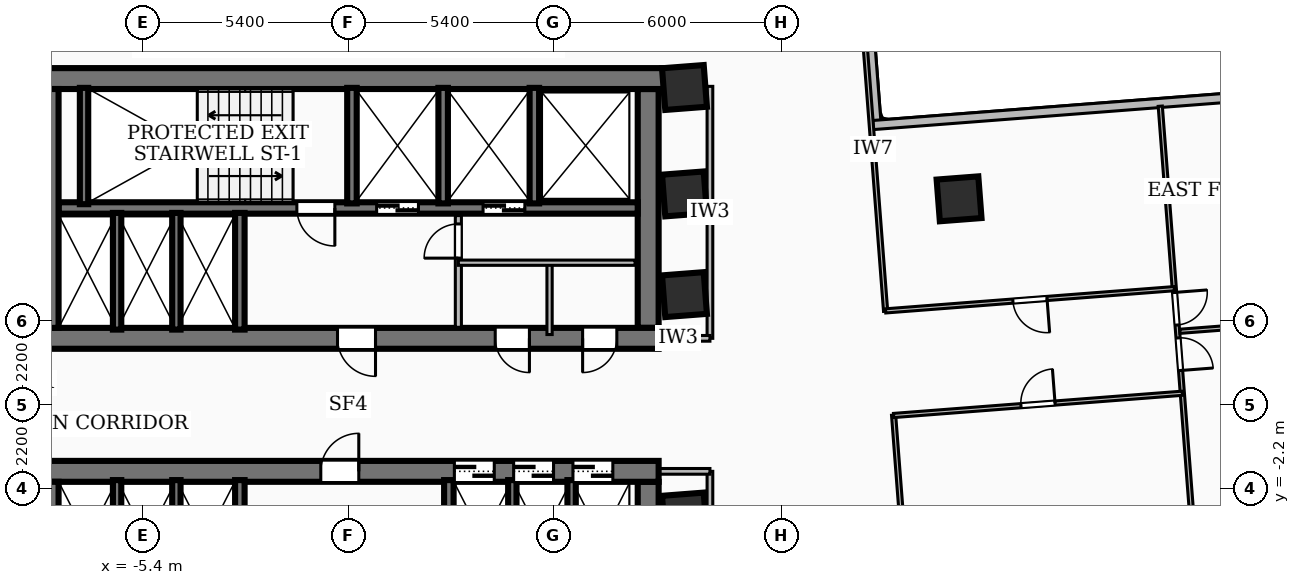
"""IFC4 building model, lengths in metres.
Left out: names, types, materials, properties, quantities, classifications, styles, units other than length and angle.
Written with IfcOpenShell. Run it as: python <this file> out.ifc"""

import sys

from ifc_helpers import new_model, si_unit, direction, frame, frame_2d, origin, origin_2d, place, context, subcontext, project, spatial, rectangle, extrude, element, fill, save


model = new_model("IFC4")
c1 = context("Model", 3, precision=1e-05, world=origin(), true_north=direction((0.0, 1.0)))
c2 = subcontext(c1, "Body", "Model", "MODEL_VIEW")
j1 = project(units=[si_unit("LENGTHUNIT", "METRE"), si_unit("PLANEANGLEUNIT", "RADIAN")], contexts=[c1])
p1 = place(None, origin())
s1 = spatial("IfcSite", under=j1, at=p1, CompositionType="ELEMENT")
p2 = place(p1, origin())
s2 = spatial("IfcBuilding", under=s1, at=p2, CompositionType="ELEMENT")
p3 = place(p2, frame((0.0, 0.0, 56.88)))
s3 = spatial("IfcBuildingStorey", under=s2, at=p3, CompositionType="ELEMENT", Elevation=56.88)
p4 = place(p3, frame((-8.78, 8.585, 0.0), z_axis=(0.0, 0.0, 1.0), x_axis=(1.0, 0.0, 0.0)))
e1 = element("IfcWall", 1, at=p4, inside=s3, PredefinedType="SHEAR", context=c2, shape_type="SweptSolid", body=[
    extrude(rectangle(XDim=17.56, YDim=0.55, at=frame_2d((8.78, 0.0))), origin(), (0.0, 0.0, 1.0), 3.32),
])
p5 = place(p3, frame((8.17, 1.75, 0.0), z_axis=(0.0, 0.0, 1.0), x_axis=(-1.0, 0.0, 0.0)))
e2 = element("IfcWall", 2, at=p5, inside=s3, PredefinedType="SHEAR", context=c2, shape_type="SweptSolid", body=[
    extrude(rectangle(XDim=16.34, YDim=0.55, at=frame_2d((8.17, 0.0))), origin(), (0.0, 0.0, 1.0), 3.32),
])
p6 = place(p5, frame((7.45, 0.0, 0.0)))
e3 = element("IfcOpeningElement", 3, at=p6, cuts=e2, PredefinedType="OPENING", context=c2, shape_type="SweptSolid", body=[
    extrude(rectangle(XDim=1.0, YDim=2.1, at=frame_2d((0.5, 1.05))), frame((0.0, 0.285, 0.0), z_axis=(0.0, -1.0, 0.0), x_axis=(1.0, 0.0, 0.0)), (0.0, 0.0, 1.0), 0.57),
])
p7 = place(p5, frame((3.4, 0.0, 0.0)))
e4 = element("IfcOpeningElement", 4, at=p7, cuts=e2, PredefinedType="OPENING", context=c2, shape_type="SweptSolid", body=[
    extrude(rectangle(XDim=0.9, YDim=2.06, at=frame_2d((0.45, 1.03))), frame((0.0, 0.285, 0.0), z_axis=(0.0, -1.0, 0.0), x_axis=(1.0, 0.0, 0.0)), (0.0, 0.0, 1.0), 0.57),
])
p8 = place(p5, frame((1.1, 0.0, 0.0)))
e5 = element("IfcOpeningElement", 5, at=p8, cuts=e2, PredefinedType="OPENING", context=c2, shape_type="SweptSolid", body=[
    extrude(rectangle(XDim=0.9, YDim=2.06, at=frame_2d((0.45, 1.03))), frame((0.0, 0.285, 0.0), z_axis=(0.0, -1.0, 0.0), x_axis=(1.0, 0.0, 0.0)), (0.0, 0.0, 1.0), 0.57),
])
for number, where, z_axis, x_axis in (
    (6, (-7.895, 2.025, 0.0), (0.0, 0.0, 1.0), (0.0, 1.0, 0.0)),
    (7, (7.895, 8.31, 0.0), (0.0, 0.0, 1.0), (0.0, -1.0, 0.0)),
):
    element("IfcWall", number, at=place(p3, frame(where, z_axis=z_axis, x_axis=x_axis)), inside=s3, PredefinedType="SHEAR", context=c2, shape_type="SweptSolid", body=[
        extrude(rectangle(XDim=6.285, YDim=0.55, at=frame_2d((3.143, 0.0))), origin(), (0.0, 0.0, 1.0), 3.32),
    ])
p9 = place(p3, frame((7.62, 5.18, 0.0), z_axis=(0.0, 0.0, 1.0), x_axis=(-1.0, 0.0, 0.0)))
e8 = element("IfcWall", 8, at=p9, inside=s3, PredefinedType="SOLIDWALL", context=c2, shape_type="SweptSolid", body=[
    extrude(rectangle(XDim=15.24, YDim=0.3, at=frame_2d((7.62, 0.0))), origin(), (0.0, 0.0, 1.0), 3.32),
])
p10 = place(p9, frame((5.77, 0.0, 0.0)))
e9 = element("IfcOpeningElement", 9, at=p10, cuts=e8, PredefinedType="OPENING", context=c2, shape_type="SweptSolid", body=[
    extrude(rectangle(XDim=1.1, YDim=2.15, at=frame_2d((0.55, 1.075))), frame((0.0, 0.16, 0.0), z_axis=(0.0, -1.0, 0.0), x_axis=(1.0, 0.0, 0.0)), (0.0, 0.0, 1.0), 0.32),
])
p11 = place(p9, frame((2.97, 0.0, 0.0)))
e10 = element("IfcOpeningElement", 10, at=p11, cuts=e8, PredefinedType="OPENING", context=c2, shape_type="SweptSolid", body=[
    extrude(rectangle(XDim=1.1, YDim=2.15, at=frame_2d((0.55, 1.075))), frame((0.0, 0.16, 0.0), z_axis=(0.0, -1.0, 0.0), x_axis=(1.0, 0.0, 0.0)), (0.0, 0.0, 1.0), 0.32),
])
p12 = place(p9, frame((7.97, 0.0, 0.0)))
e11 = element("IfcOpeningElement", 11, at=p12, cuts=e8, PredefinedType="OPENING", context=c2, shape_type="SweptSolid", body=[
    extrude(rectangle(XDim=1.0, YDim=2.1, at=frame_2d((0.5, 1.05))), frame((0.0, 0.16, 0.0), z_axis=(0.0, -1.0, 0.0), x_axis=(1.0, 0.0, 0.0)), (0.0, 0.0, 1.0), 0.32),
])
p13 = place(p3, frame((-8.17, -1.75, 0.0), z_axis=(0.0, 0.0, 1.0), x_axis=(1.0, 0.0, 0.0)))
e12 = element("IfcWall", 12, at=p13, inside=s3, PredefinedType="SHEAR", context=c2, shape_type="SweptSolid", body=[
    extrude(rectangle(XDim=16.34, YDim=0.55, at=frame_2d((8.17, 0.0))), origin(), (0.0, 0.0, 1.0), 3.32),
])
p14 = place(p13, frame((7.45, 0.0, 0.0)))
e13 = element("IfcOpeningElement", 13, at=p14, cuts=e12, PredefinedType="OPENING", context=c2, shape_type="SweptSolid", body=[
    extrude(rectangle(XDim=1.0, YDim=2.1, at=frame_2d((0.5, 1.05))), frame((0.0, 0.285, 0.0), z_axis=(0.0, -1.0, 0.0), x_axis=(1.0, 0.0, 0.0)), (0.0, 0.0, 1.0), 0.57),
])
p15 = place(p13, frame((10.965, 0.0, 0.0)))
e14 = element("IfcOpeningElement", 14, at=p15, cuts=e12, PredefinedType="OPENING", context=c2, shape_type="SweptSolid", body=[
    extrude(rectangle(XDim=1.05, YDim=2.15, at=frame_2d((0.525, 1.075))), frame((0.0, 0.285, 0.0), z_axis=(0.0, -1.0, 0.0), x_axis=(1.0, 0.0, 0.0)), (0.0, 0.0, 1.0), 0.57),
])
p16 = place(p13, frame((12.525, 0.0, 0.0)))
e15 = element("IfcOpeningElement", 15, at=p16, cuts=e12, PredefinedType="OPENING", context=c2, shape_type="SweptSolid", body=[
    extrude(rectangle(XDim=1.05, YDim=2.15, at=frame_2d((0.525, 1.075))), frame((0.0, 0.285, 0.0), z_axis=(0.0, -1.0, 0.0), x_axis=(1.0, 0.0, 0.0)), (0.0, 0.0, 1.0), 0.57),
])
p17 = place(p13, frame((14.085, 0.0, 0.0)))
e16 = element("IfcOpeningElement", 16, at=p17, cuts=e12, PredefinedType="OPENING", context=c2, shape_type="SweptSolid", body=[
    extrude(rectangle(XDim=1.05, YDim=2.15, at=frame_2d((0.525, 1.075))), frame((0.0, 0.285, 0.0), z_axis=(0.0, -1.0, 0.0), x_axis=(1.0, 0.0, 0.0)), (0.0, 0.0, 1.0), 0.57),
])
for number, where, z_axis, x_axis in (
    (17, (-7.895, -8.31, 0.0), (0.0, 0.0, 1.0), (0.0, 1.0, 0.0)),
    (18, (7.895, -2.025, 0.0), (0.0, 0.0, 1.0), (0.0, -1.0, 0.0)),
):
    element("IfcWall", number, at=place(p3, frame(where, z_axis=z_axis, x_axis=x_axis)), inside=s3, PredefinedType="SHEAR", context=c2, shape_type="SweptSolid", body=[
        extrude(rectangle(XDim=6.285, YDim=0.55, at=frame_2d((3.143, 0.0))), origin(), (0.0, 0.0, 1.0), 3.32),
    ])
p18 = place(p3, frame((-6.95, 5.28, 0.0), z_axis=(0.0, 0.0, 1.0), x_axis=(0.0, 1.0, 0.0)))
e19 = element("IfcWall", 19, at=p18, inside=s3, PredefinedType="SOLIDWALL", context=c2, shape_type="SweptSolid", body=[
    extrude(rectangle(XDim=3.06, YDim=0.22, at=frame_2d((1.53, 0.0))), origin(), (0.0, 0.0, 1.0), 3.32),
])
for number, where, z_axis, x_axis in (
    (20, (0.1, 5.3, 0.0), (0.0, 0.0, 1.0), (0.0, 1.0, 0.0)),
    (21, (2.5, 5.3, 0.0), (0.0, 0.0, 1.0), (0.0, 1.0, 0.0)),
    (22, (4.9, 5.3, 0.0), (0.0, 0.0, 1.0), (0.0, 1.0, 0.0)),
):
    element("IfcWall", number, at=place(p3, frame(where, z_axis=z_axis, x_axis=x_axis)), inside=s3, PredefinedType="SOLIDWALL", context=c2, shape_type="SweptSolid", body=[
        extrude(rectangle(XDim=3.04, YDim=0.25, at=frame_2d((1.52, 0.0))), origin(), (0.0, 0.0, 1.0), 3.32),
    ])
for number, where, z_axis, x_axis in (
    (23, (-2.85, 1.98, 0.0), (0.0, 0.0, 1.0), (0.0, 1.0, 0.0)),
    (24, (-2.85, -5.05, 0.0), (0.0, 0.0, 1.0), (0.0, 1.0, 0.0)),
    (25, (2.65, -5.05, 0.0), (0.0, 0.0, 1.0), (0.0, 1.0, 0.0)),
):
    element("IfcWall", number, at=place(p3, frame(where, z_axis=z_axis, x_axis=x_axis)), inside=s3, PredefinedType="SOLIDWALL", context=c2, shape_type="SweptSolid", body=[
        extrude(rectangle(XDim=3.07, YDim=0.25, at=frame_2d((1.535, 0.0))), origin(), (0.0, 0.0, 1.0), 3.32),
    ])
for number, where, z_axis, x_axis in (
    (26, (-6.08, 1.98, 0.0), (0.0, 0.0, 1.0), (0.0, 1.0, 0.0)),
    (27, (-4.52, 1.98, 0.0), (0.0, 0.0, 1.0), (0.0, 1.0, 0.0)),
    (28, (4.32, -5.05, 0.0), (0.0, 0.0, 1.0), (0.0, 1.0, 0.0)),
    (29, (5.88, -5.05, 0.0), (0.0, 0.0, 1.0), (0.0, 1.0, 0.0)),
    (30, (-6.08, -5.05, 0.0), (0.0, 0.0, 1.0), (0.0, 1.0, 0.0)),
    (31, (-4.52, -5.05, 0.0), (0.0, 0.0, 1.0), (0.0, 1.0, 0.0)),
):
    element("IfcWall", number, at=place(p3, frame(where, z_axis=z_axis, x_axis=x_axis)), inside=s3, PredefinedType="SOLIDWALL", context=c2, shape_type="SweptSolid", body=[
        extrude(rectangle(XDim=3.07, YDim=0.22, at=frame_2d((1.535, 0.0))), origin(), (0.0, 0.0, 1.0), 3.32),
    ])
for number, where, z_axis, x_axis in (
    (32, (8.85, -2.9, 0.0), (0.0, 0.0, 1.0), (0.997, 0.077, 0.0)),
    (33, (8.85, 2.9, 0.0), (0.0, 0.0, 1.0), (0.997, 0.077, 0.0)),
    (34, (8.85, 5.55, 0.0), (0.0, 0.0, 1.0), (0.997, 0.077, 0.0)),
    (35, (8.85, 8.35, 0.0), (0.0, 0.0, 1.0), (0.997, 0.077, 0.0)),
    (36, (16.076, 5.421, 0.0), (0.0, 0.0, 1.0), (0.997, 0.077, 0.0)),
):
    element("IfcColumn", number, at=place(p3, frame(where, z_axis=z_axis, x_axis=x_axis)), inside=s3, PredefinedType="COLUMN", context=c2, shape_type="SweptSolid", body=[
        extrude(rectangle(XDim=1.1, YDim=1.1, at=origin_2d()), origin(), (0.0, 0.0, 1.0), 3.6),
    ])
p19 = place(p3, frame((13.393, 14.028, 0.0), z_axis=(0.0, 0.0, 1.0), x_axis=(0.076754366588, -0.997050032451, 0.0)))
e37 = element("IfcWall", 37, at=p19, inside=s3, PredefinedType="SOLIDWALL", context=c2, shape_type="SweptSolid", body=[
    extrude(rectangle(XDim=6.775, YDim=0.24, at=frame_2d((3.388, 0.0))), origin(), (0.0, 0.0, 1.0), 3.32),
])
p20 = place(p3, frame((13.81, 7.362, 0.0), z_axis=(0.0, 0.0, 1.0), x_axis=(0.997055761943, 0.076679903335, 0.0)))
e38 = element("IfcWall", 38, at=p20, inside=s3, PredefinedType="SOLIDWALL", context=c2, shape_type="SweptSolid", body=[
    extrude(rectangle(XDim=16.875, YDim=0.24, at=frame_2d((8.438, 0.0))), origin(), (0.0, 0.0, 1.0), 3.32),
])
p21 = place(p20, frame((13.375, 0.0, 0.85)))
e39 = element("IfcOpeningElement", 39, at=p21, cuts=e38, PredefinedType="OPENING", context=c2, shape_type="SweptSolid", body=[
    extrude(rectangle(XDim=2.4, YDim=1.65, at=frame_2d((1.2, 0.825))), frame((0.0, 0.13, 0.0), z_axis=(0.0, -1.0, 0.0), x_axis=(1.0, 0.0, 0.0)), (0.0, 0.0, 1.0), 0.26),
])
p22 = place(p3, frame((2.9, 2.04, 0.0), z_axis=(0.0, 0.0, 1.0), x_axis=(0.0, 1.0, 0.0)))
e40 = element("IfcWall", 40, at=p22, inside=s3, PredefinedType="PARTITIONING", context=c2, shape_type="SweptSolid", body=[
    extrude(rectangle(XDim=2.94, YDim=0.16, at=frame_2d((1.47, 0.0))), origin(), (0.0, 0.0, 1.0), 2.385),
])
p23 = place(p22, frame((1.82, 0.0, 0.0)))
e41 = element("IfcOpeningElement", 41, at=p23, cuts=e40, PredefinedType="OPENING", context=c2, shape_type="SweptSolid", body=[
    extrude(rectangle(XDim=0.9, YDim=2.06, at=frame_2d((0.45, 1.03))), frame((0.0, 0.09, 0.0), z_axis=(0.0, -1.0, 0.0), x_axis=(1.0, 0.0, 0.0)), (0.0, 0.0, 1.0), 0.18),
])
p24 = place(p3, frame((2.9, 3.74, 0.0), z_axis=(0.0, 0.0, 1.0), x_axis=(1.0, 0.0, 0.0)))
e42 = element("IfcWall", 42, at=p24, inside=s3, PredefinedType="PARTITIONING", context=c2, shape_type="SweptSolid", body=[
    extrude(rectangle(XDim=4.65, YDim=0.138, at=frame_2d((2.325, 0.0))), origin(), (0.0, 0.0, 1.0), 3.32),
])
p25 = place(p3, frame((5.3, 1.85, 0.0), z_axis=(0.0, 0.0, 1.0), x_axis=(0.0, 1.0, 0.0)))
e43 = element("IfcWall", 43, at=p25, inside=s3, PredefinedType="PARTITIONING", context=c2, shape_type="SweptSolid", body=[
    extrude(rectangle(XDim=1.89, YDim=0.138, at=frame_2d((0.945, 0.0))), origin(), (0.0, 0.0, 1.0), 2.385),
])
p26 = place(p3, frame((9.52, 1.75, 0.0), z_axis=(0.0, 0.0, 1.0), x_axis=(0.0, 1.0, 0.0)))
e44 = element("IfcWall", 44, at=p26, inside=s3, PredefinedType="PARTITIONING", context=c2, shape_type="SweptSolid", body=[
    extrude(rectangle(XDim=6.63, YDim=0.15, at=frame_2d((3.315, 0.0))), origin(), (0.0, 0.0, 1.0), 2.401),
])
p27 = place(p3, frame((7.85, 1.75, 0.0), z_axis=(0.0, 0.0, 1.0), x_axis=(1.0, 0.0, 0.0)))
e45 = element("IfcWall", 45, at=p27, inside=s3, PredefinedType="PARTITIONING", context=c2, shape_type="SweptSolid", body=[
    extrude(rectangle(XDim=1.67, YDim=0.15, at=frame_2d((0.835, 0.0))), origin(), (0.0, 0.0, 1.0), 2.385),
])
p28 = place(p3, frame((9.52, -8.38, 0.0), z_axis=(0.0, 0.0, 1.0), x_axis=(0.0, 1.0, 0.0)))
e46 = element("IfcWall", 46, at=p28, inside=s3, PredefinedType="PARTITIONING", context=c2, shape_type="SweptSolid", body=[
    extrude(rectangle(XDim=6.63, YDim=0.15, at=frame_2d((3.315, 0.0))), origin(), (0.0, 0.0, 1.0), 2.401),
])
p29 = place(p3, frame((7.85, -1.75, 0.0), z_axis=(0.0, 0.0, 1.0), x_axis=(1.0, 0.0, 0.0)))
e47 = element("IfcWall", 47, at=p29, inside=s3, PredefinedType="PARTITIONING", context=c2, shape_type="SweptSolid", body=[
    extrude(rectangle(XDim=1.67, YDim=0.15, at=frame_2d((0.835, 0.0))), origin(), (0.0, 0.0, 1.0), 2.385),
])
p30 = place(p3, frame((14.143, 2.462, 0.0), z_axis=(0.0, 0.0, 1.0), x_axis=(-0.076722700704, 0.997052469631, 0.0)))
e48 = element("IfcWall", 48, at=p30, inside=s3, PredefinedType="PARTITIONING", context=c2, shape_type="SweptSolid", body=[
    extrude(rectangle(XDim=8.55, YDim=0.11, at=frame_2d((4.275, 0.0))), origin(), (0.0, 0.0, 1.0), 2.401),
])
p31 = place(p3, frame((14.963, -8.197, 0.0), z_axis=(0.0, 0.0, 1.0), x_axis=(-0.076708240121, 0.99705358226, 0.0)))
e49 = element("IfcWall", 49, at=p31, inside=s3, PredefinedType="PARTITIONING", context=c2, shape_type="SweptSolid", body=[
    extrude(rectangle(XDim=7.95, YDim=0.11, at=frame_2d((3.975, 0.0))), origin(), (0.0, 0.0, 1.0), 2.401),
])
p32 = place(p3, frame((21.74, 3.057, 0.0), z_axis=(0.0, 0.0, 1.0), x_axis=(-0.997049394946, -0.076762647418, 0.0)))
e50 = element("IfcWall", 50, at=p32, inside=s3, PredefinedType="PARTITIONING", context=c2, shape_type="SweptSolid", body=[
    extrude(rectangle(XDim=7.62, YDim=0.11, at=frame_2d((3.81, 0.0))), origin(), (0.0, 0.0, 1.0), 3.32),
])
p33 = place(p32, frame((3.36, 0.0, 0.0)))
e51 = element("IfcOpeningElement", 51, at=p33, cuts=e50, PredefinedType="OPENING", context=c2, shape_type="SweptSolid", body=[
    extrude(rectangle(XDim=0.9, YDim=2.06, at=frame_2d((0.45, 1.03))), frame((0.0, 0.065, 0.0), z_axis=(0.0, -1.0, 0.0), x_axis=(1.0, 0.0, 0.0)), (0.0, 0.0, 1.0), 0.13),
])
p34 = place(p3, frame((14.354, -0.28, 0.0), z_axis=(0.0, 0.0, 1.0), x_axis=(0.997048639669, 0.076772456877, 0.0)))
e52 = element("IfcWall", 52, at=p34, inside=s3, PredefinedType="PARTITIONING", context=c2, shape_type="SweptSolid", body=[
    extrude(rectangle(XDim=7.619, YDim=0.11, at=frame_2d((3.81, 0.0))), origin(), (0.0, 0.0, 1.0), 3.32),
])
p35 = place(p34, frame((3.36, 0.0, 0.0)))
e53 = element("IfcOpeningElement", 53, at=p35, cuts=e52, PredefinedType="OPENING", context=c2, shape_type="SweptSolid", body=[
    extrude(rectangle(XDim=0.9, YDim=2.06, at=frame_2d((0.45, 1.03))), frame((0.0, 0.065, 0.0), z_axis=(0.0, -1.0, 0.0), x_axis=(1.0, 0.0, 0.0)), (0.0, 0.0, 1.0), 0.13),
])
p36 = place(p3, frame((21.886, 1.935, 0.0), z_axis=(0.0, 0.0, 1.0), x_axis=(0.997054350339, 0.076698255973, 0.0)))
e54 = element("IfcWall", 54, at=p36, inside=s3, PredefinedType="PARTITIONING", context=c2, shape_type="SweptSolid", body=[
    extrude(rectangle(XDim=10.625, YDim=0.11, at=frame_2d((5.312, 0.0))), origin(), (0.0, 0.0, 1.0), 2.812),
])
p37 = place(p3, frame((21.37, 7.858, 0.0), z_axis=(0.0, 0.0, 1.0), x_axis=(0.076662005745, -0.99705713822, 0.0)))
e55 = element("IfcWall", 55, at=p37, inside=s3, PredefinedType="PARTITIONING", context=c2, shape_type="SweptSolid", body=[
    extrude(rectangle(XDim=12.99, YDim=0.11, at=frame_2d((6.495, 0.0))), origin(), (0.0, 0.0, 1.0), 2.401),
])
p38 = place(p37, frame((6.115, 0.0, 0.0)))
e56 = element("IfcOpeningElement", 56, at=p38, cuts=e55, PredefinedType="OPENING", context=c2, shape_type="SweptSolid", body=[
    extrude(rectangle(XDim=0.86, YDim=2.04, at=frame_2d((0.43, 1.02))), frame((0.0, 0.065, 0.0), z_axis=(0.0, -1.0, 0.0), x_axis=(1.0, 0.0, 0.0)), (0.0, 0.0, 1.0), 0.13),
])
p39 = place(p37, frame((4.915, 0.0, 0.0)))
e57 = element("IfcOpeningElement", 57, at=p39, cuts=e55, PredefinedType="OPENING", context=c2, shape_type="SweptSolid", body=[
    extrude(rectangle(XDim=0.86, YDim=2.04, at=frame_2d((0.43, 1.02))), frame((0.0, 0.065, 0.0), z_axis=(0.0, -1.0, 0.0), x_axis=(1.0, 0.0, 0.0)), (0.0, 0.0, 1.0), 0.13),
])
p40 = place(p6, origin())
e58 = element("IfcDoor", 58, at=p40, inside=s3, OperationType="SINGLE_SWING_LEFT", PredefinedType="DOOR", context=c2, shape_type="SweptSolid", body=[
    extrude(rectangle(XDim=1.0, YDim=2.1, at=frame_2d((0.5, 1.05))), frame((0.0, 0.025, 0.0), z_axis=(0.0, -1.0, 0.0), x_axis=(1.0, 0.0, 0.0)), (0.0, 0.0, 1.0), 0.05),
])
fill(e3, e58)
p41 = place(p14, origin())
e59 = element("IfcDoor", 59, at=p41, inside=s3, OperationType="SINGLE_SWING_RIGHT", PredefinedType="DOOR", context=c2, shape_type="SweptSolid", body=[
    extrude(rectangle(XDim=1.0, YDim=2.1, at=frame_2d((0.5, 1.05))), frame((0.0, 0.025, 0.0), z_axis=(0.0, -1.0, 0.0), x_axis=(1.0, 0.0, 0.0)), (0.0, 0.0, 1.0), 0.05),
])
fill(e13, e59)
p42 = place(p10, origin())
e60 = element("IfcDoor", 60, at=p42, inside=s3, OperationType="DOUBLE_DOOR_SLIDING", PredefinedType="DOOR", context=c2, shape_type="SweptSolid", body=[
    extrude(rectangle(XDim=1.1, YDim=2.15, at=frame_2d((0.55, 1.075))), frame((0.0, 0.025, 0.0), z_axis=(0.0, -1.0, 0.0), x_axis=(1.0, 0.0, 0.0)), (0.0, 0.0, 1.0), 0.05),
])
fill(e9, e60)
p43 = place(p11, origin())
e61 = element("IfcDoor", 61, at=p43, inside=s3, OperationType="DOUBLE_DOOR_SLIDING", PredefinedType="DOOR", context=c2, shape_type="SweptSolid", body=[
    extrude(rectangle(XDim=1.1, YDim=2.15, at=frame_2d((0.55, 1.075))), frame((0.0, 0.025, 0.0), z_axis=(0.0, -1.0, 0.0), x_axis=(1.0, 0.0, 0.0)), (0.0, 0.0, 1.0), 0.05),
])
fill(e10, e61)
p44 = place(p12, origin())
e62 = element("IfcDoor", 62, at=p44, inside=s3, OperationType="SINGLE_SWING_LEFT", PredefinedType="DOOR", context=c2, shape_type="SweptSolid", body=[
    extrude(rectangle(XDim=1.0, YDim=2.1, at=frame_2d((0.5, 1.05))), frame((0.0, 0.025, 0.0), z_axis=(0.0, -1.0, 0.0), x_axis=(1.0, 0.0, 0.0)), (0.0, 0.0, 1.0), 0.05),
])
fill(e11, e62)
p45 = place(p15, origin())
e63 = element("IfcDoor", 63, at=p45, inside=s3, OperationType="DOUBLE_DOOR_SLIDING", PredefinedType="DOOR", context=c2, shape_type="SweptSolid", body=[
    extrude(rectangle(XDim=1.05, YDim=2.15, at=frame_2d((0.525, 1.075))), frame((0.0, 0.025, 0.0), z_axis=(0.0, -1.0, 0.0), x_axis=(1.0, 0.0, 0.0)), (0.0, 0.0, 1.0), 0.05),
])
fill(e14, e63)
p46 = place(p16, origin())
e64 = element("IfcDoor", 64, at=p46, inside=s3, OperationType="DOUBLE_DOOR_SLIDING", PredefinedType="DOOR", context=c2, shape_type="SweptSolid", body=[
    extrude(rectangle(XDim=1.05, YDim=2.15, at=frame_2d((0.525, 1.075))), frame((0.0, 0.025, 0.0), z_axis=(0.0, -1.0, 0.0), x_axis=(1.0, 0.0, 0.0)), (0.0, 0.0, 1.0), 0.05),
])
fill(e15, e64)
p47 = place(p17, origin())
e65 = element("IfcDoor", 65, at=p47, inside=s3, OperationType="DOUBLE_DOOR_SLIDING", PredefinedType="DOOR", context=c2, shape_type="SweptSolid", body=[
    extrude(rectangle(XDim=1.05, YDim=2.15, at=frame_2d((0.525, 1.075))), frame((0.0, 0.025, 0.0), z_axis=(0.0, -1.0, 0.0), x_axis=(1.0, 0.0, 0.0)), (0.0, 0.0, 1.0), 0.05),
])
fill(e16, e65)
p48 = place(p7, origin())
e66 = element("IfcDoor", 66, at=p48, inside=s3, OperationType="SINGLE_SWING_LEFT", PredefinedType="DOOR", context=c2, shape_type="SweptSolid", body=[
    extrude(rectangle(XDim=0.9, YDim=2.06, at=frame_2d((0.45, 1.03))), frame((0.0, 0.025, 0.0), z_axis=(0.0, -1.0, 0.0), x_axis=(1.0, 0.0, 0.0)), (0.0, 0.0, 1.0), 0.05),
])
fill(e4, e66)
p49 = place(p8, origin())
e67 = element("IfcDoor", 67, at=p49, inside=s3, OperationType="SINGLE_SWING_RIGHT", PredefinedType="DOOR", context=c2, shape_type="SweptSolid", body=[
    extrude(rectangle(XDim=0.9, YDim=2.06, at=frame_2d((0.45, 1.03))), frame((0.0, 0.025, 0.0), z_axis=(0.0, -1.0, 0.0), x_axis=(1.0, 0.0, 0.0)), (0.0, 0.0, 1.0), 0.05),
])
fill(e5, e67)
p50 = place(p23, origin())
e68 = element("IfcDoor", 68, at=p50, inside=s3, OperationType="SINGLE_SWING_LEFT", PredefinedType="DOOR", context=c2, shape_type="SweptSolid", body=[
    extrude(rectangle(XDim=0.9, YDim=2.06, at=frame_2d((0.45, 1.03))), frame((0.0, 0.025, 0.0), z_axis=(0.0, -1.0, 0.0), x_axis=(1.0, 0.0, 0.0)), (0.0, 0.0, 1.0), 0.05),
])
fill(e41, e68)
p51 = place(p33, origin())
e69 = element("IfcDoor", 69, at=p51, inside=s3, OperationType="SINGLE_SWING_LEFT", PredefinedType="DOOR", context=c2, shape_type="SweptSolid", body=[
    extrude(rectangle(XDim=0.9, YDim=2.06, at=frame_2d((0.45, 1.03))), frame((0.0, 0.025, 0.0), z_axis=(0.0, -1.0, 0.0), x_axis=(1.0, 0.0, 0.0)), (0.0, 0.0, 1.0), 0.05),
])
fill(e51, e69)
p52 = place(p35, origin())
e70 = element("IfcDoor", 70, at=p52, inside=s3, OperationType="SINGLE_SWING_RIGHT", PredefinedType="DOOR", context=c2, shape_type="SweptSolid", body=[
    extrude(rectangle(XDim=0.9, YDim=2.06, at=frame_2d((0.45, 1.03))), frame((0.0, 0.025, 0.0), z_axis=(0.0, -1.0, 0.0), x_axis=(1.0, 0.0, 0.0)), (0.0, 0.0, 1.0), 0.05),
])
fill(e53, e70)
p53 = place(p38, origin())
e71 = element("IfcDoor", 71, at=p53, inside=s3, OperationType="SINGLE_SWING_RIGHT", PredefinedType="DOOR", context=c2, shape_type="SweptSolid", body=[
    extrude(rectangle(XDim=0.86, YDim=2.04, at=frame_2d((0.43, 1.02))), frame((0.0, 0.025, 0.0), z_axis=(0.0, -1.0, 0.0), x_axis=(1.0, 0.0, 0.0)), (0.0, 0.0, 1.0), 0.05),
])
fill(e56, e71)
p54 = place(p39, origin())
e72 = element("IfcDoor", 72, at=p54, inside=s3, OperationType="SINGLE_SWING_LEFT", PredefinedType="DOOR", context=c2, shape_type="SweptSolid", body=[
    extrude(rectangle(XDim=0.86, YDim=2.04, at=frame_2d((0.43, 1.02))), frame((0.0, 0.025, 0.0), z_axis=(0.0, -1.0, 0.0), x_axis=(1.0, 0.0, 0.0)), (0.0, 0.0, 1.0), 0.05),
])
fill(e57, e72)
save(model, sys.argv[1])
